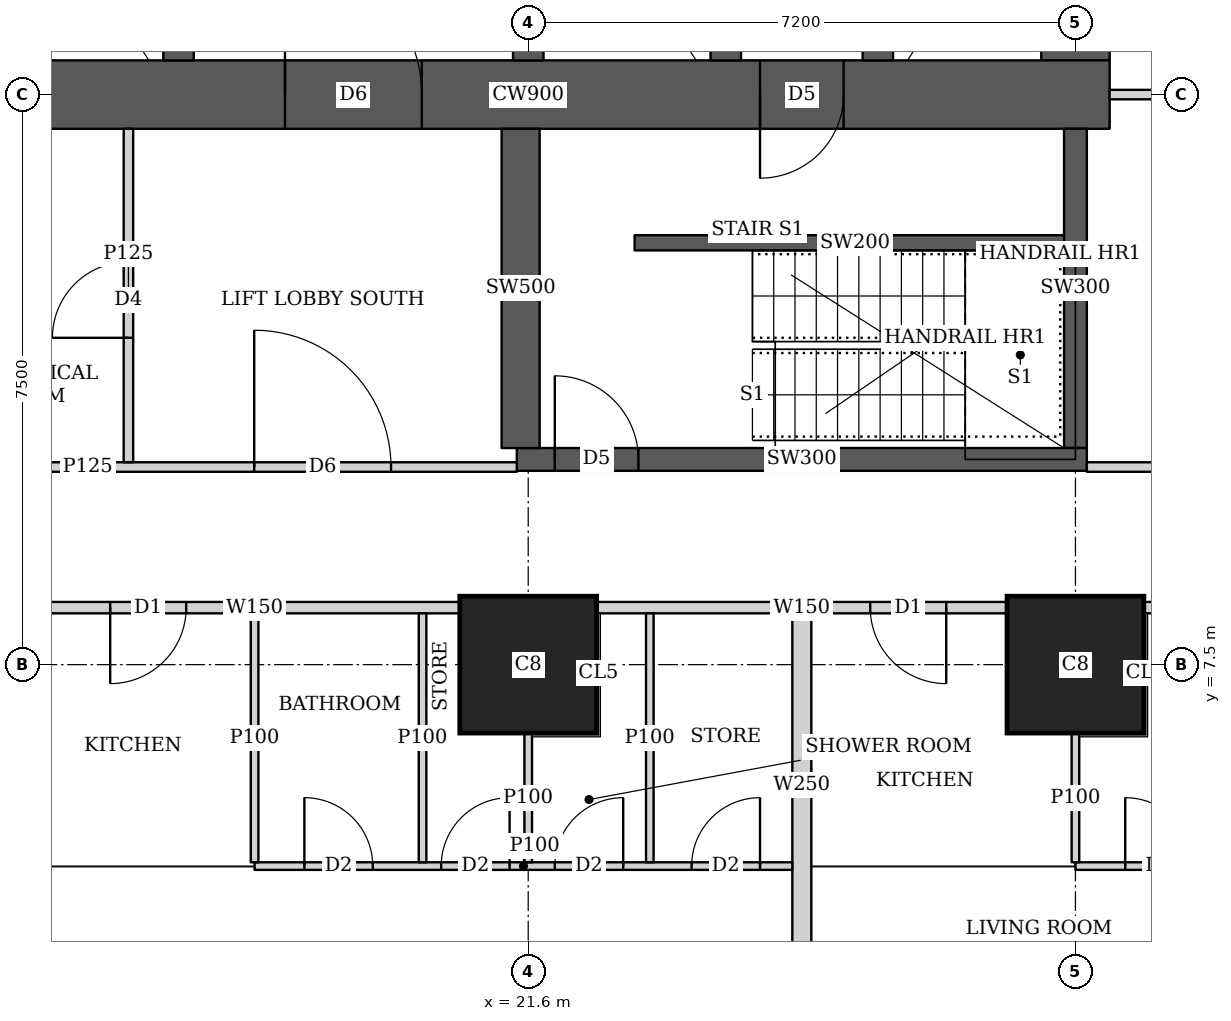
"""IFC4 building model, lengths in metres.
Left out: names, types, materials, properties, quantities, classifications, styles, units other than length and angle.
Written with IfcOpenShell. Run it as: python <this file> out.ifc"""

import sys

from ifc_helpers import new_model, si_unit, direction, frame, frame_2d, origin, origin_2d, place, context, subcontext, project, spatial, rectangle, extrude, element, fill, save


model = new_model("IFC4")
c1 = context("Model", 3, precision=1e-05, world=origin(), true_north=direction((0.0, 1.0)))
c2 = subcontext(c1, "Body", "Model", "MODEL_VIEW")
j1 = project(units=[si_unit("LENGTHUNIT", "METRE"), si_unit("PLANEANGLEUNIT", "RADIAN")], contexts=[c1])
p1 = place(None, origin())
s1 = spatial("IfcSite", under=j1, at=p1, CompositionType="ELEMENT")
p2 = place(p1, origin())
s2 = spatial("IfcBuilding", under=s1, at=p2, CompositionType="ELEMENT")
p3 = place(p2, frame((0.0, 0.0, 31.25)))
s3 = spatial("IfcBuildingStorey", under=s2, at=p3, CompositionType="ELEMENT", Elevation=31.25)
for number, where, z_axis, x_axis in (
    (1, (21.6, 7.5, 0.0), (0.0, 0.0, 1.0), (1.0, 0.0, 0.0)),
    (2, (28.8, 7.5, 0.0), (0.0, 0.0, 1.0), (1.0, 0.0, 0.0)),
):
    element("IfcColumn", number, at=place(p3, frame(where, z_axis=z_axis, x_axis=x_axis)), inside=s3, PredefinedType="COLUMN", context=c2, shape_type="SweptSolid", body=[
        extrude(rectangle(XDim=1.8, YDim=1.8, at=origin_2d()), origin(), (0.0, 0.0, 1.0), 3.75),
    ])
p4 = place(p3, frame((13.95, 15.0, 0.0), z_axis=(0.0, 0.0, 1.0), x_axis=(1.0, 0.0, 0.0)))
e3 = element("IfcWall", 3, at=p4, inside=s3, PredefinedType="SHEAR", context=c2, shape_type="SweptSolid", body=[
    extrude(rectangle(XDim=15.3, YDim=0.9, at=frame_2d((7.65, 0.0))), origin(), (0.0, 0.0, 1.0), 3.75),
])
p5 = place(p4, frame((4.45, 0.0, 0.0)))
e4 = element("IfcOpeningElement", 4, at=p5, cuts=e3, PredefinedType="OPENING", context=c2, shape_type="SweptSolid", body=[
    extrude(rectangle(XDim=1.8, YDim=2.1, at=frame_2d((0.9, 1.05))), frame((0.0, 0.46, 0.0), z_axis=(0.0, -1.0, 0.0), x_axis=(1.0, 0.0, 0.0)), (0.0, 0.0, 1.0), 0.92),
])
p6 = place(p4, frame((10.7, 0.0, 0.0)))
e5 = element("IfcOpeningElement", 5, at=p6, cuts=e3, PredefinedType="OPENING", context=c2, shape_type="SweptSolid", body=[
    extrude(rectangle(XDim=1.1, YDim=2.1, at=frame_2d((0.55, 1.05))), frame((0.0, 0.46, 0.0), z_axis=(0.0, -1.0, 0.0), x_axis=(1.0, 0.0, 0.0)), (0.0, 0.0, 1.0), 0.92),
])
p7 = place(p3, frame((28.8, 15.45, 0.0), z_axis=(0.0, 0.0, 1.0), x_axis=(0.0, 1.0, 0.0)))
e6 = element("IfcWall", 6, at=p7, inside=s3, PredefinedType="SHEAR", context=c2, shape_type="SweptSolid", body=[
    extrude(rectangle(XDim=14.1, YDim=0.9, at=frame_2d((7.05, 0.0))), origin(), (0.0, 0.0, 1.0), 3.75),
])
p8 = place(p3, frame((17.0, 15.45, 0.0), z_axis=(0.0, 0.0, 1.0), x_axis=(0.0, 1.0, 0.0)))
e7 = element("IfcWall", 7, at=p8, inside=s3, PredefinedType="SHEAR", context=c2, shape_type="SweptSolid", body=[
    extrude(rectangle(XDim=14.1, YDim=0.4, at=frame_2d((7.05, 0.0))), origin(), (0.0, 0.0, 1.0), 3.75),
])
p9 = place(p8, frame((0.875, 0.0, 0.0)))
e8 = element("IfcOpeningElement", 8, at=p9, cuts=e7, PredefinedType="OPENING", context=c2, shape_type="SweptSolid", body=[
    extrude(rectangle(XDim=1.1, YDim=2.1, at=frame_2d((0.55, 1.05))), frame((0.0, 0.21, 0.0), z_axis=(0.0, -1.0, 0.0), x_axis=(1.0, 0.0, 0.0)), (0.0, 0.0, 1.0), 0.42),
])
p10 = place(p8, frame((4.625, 0.0, 0.0)))
e9 = element("IfcOpeningElement", 9, at=p10, cuts=e7, PredefinedType="OPENING", context=c2, shape_type="SweptSolid", body=[
    extrude(rectangle(XDim=1.1, YDim=2.1, at=frame_2d((0.55, 1.05))), frame((0.0, 0.21, 0.0), z_axis=(0.0, -1.0, 0.0), x_axis=(1.0, 0.0, 0.0)), (0.0, 0.0, 1.0), 0.42),
])
p11 = place(p8, frame((8.375, 0.0, 0.0)))
e10 = element("IfcOpeningElement", 10, at=p11, cuts=e7, PredefinedType="OPENING", context=c2, shape_type="SweptSolid", body=[
    extrude(rectangle(XDim=1.1, YDim=2.1, at=frame_2d((0.55, 1.05))), frame((0.0, 0.21, 0.0), z_axis=(0.0, -1.0, 0.0), x_axis=(1.0, 0.0, 0.0)), (0.0, 0.0, 1.0), 0.42),
])
p12 = place(p8, frame((12.125, 0.0, 0.0)))
e11 = element("IfcOpeningElement", 11, at=p12, cuts=e7, PredefinedType="OPENING", context=c2, shape_type="SweptSolid", body=[
    extrude(rectangle(XDim=1.1, YDim=2.1, at=frame_2d((0.55, 1.05))), frame((0.0, 0.21, 0.0), z_axis=(0.0, -1.0, 0.0), x_axis=(1.0, 0.0, 0.0)), (0.0, 0.0, 1.0), 0.42),
])
for number, where, z_axis, x_axis in (
    (12, (21.6, 15.45, 0.0), (0.0, 0.0, 1.0), (0.0, 1.0, 0.0)),
    (13, (24.2, 15.45, 0.0), (0.0, 0.0, 1.0), (0.0, 1.0, 0.0)),
):
    element("IfcWall", number, at=place(p3, frame(where, z_axis=z_axis, x_axis=x_axis)), inside=s3, PredefinedType="SHEAR", context=c2, shape_type="SweptSolid", body=[
        extrude(rectangle(XDim=14.1, YDim=0.4, at=frame_2d((7.05, 0.0))), origin(), (0.0, 0.0, 1.0), 3.75),
    ])
p13 = place(p3, frame((26.2, 15.45, 0.0), z_axis=(0.0, 0.0, 1.0), x_axis=(0.0, 1.0, 0.0)))
e14 = element("IfcWall", 14, at=p13, inside=s3, PredefinedType="SHEAR", context=c2, shape_type="SweptSolid", body=[
    extrude(rectangle(XDim=3.1, YDim=0.4, at=frame_2d((1.55, 0.0))), origin(), (0.0, 0.0, 1.0), 3.75),
])
p14 = place(p13, frame((0.825, 0.0, 0.0)))
e15 = element("IfcOpeningElement", 15, at=p14, cuts=e14, PredefinedType="OPENING", context=c2, shape_type="SweptSolid", body=[
    extrude(rectangle(XDim=1.2, YDim=2.1, at=frame_2d((0.6, 1.05))), frame((0.0, 0.21, 0.0), z_axis=(0.0, -1.0, 0.0), x_axis=(1.0, 0.0, 0.0)), (0.0, 0.0, 1.0), 0.42),
])
p15 = place(p3, frame((21.45, 10.2, 0.0), z_axis=(0.0, 0.0, 1.0), x_axis=(1.0, 0.0, 0.0)))
e16 = element("IfcWall", 16, at=p15, inside=s3, PredefinedType="SHEAR", context=c2, shape_type="SweptSolid", body=[
    extrude(rectangle(XDim=7.5, YDim=0.3, at=frame_2d((3.75, 0.0))), origin(), (0.0, 0.0, 1.0), 3.75),
])
p16 = place(p15, frame((0.5, 0.0, 0.0)))
e17 = element("IfcOpeningElement", 17, at=p16, cuts=e16, PredefinedType="OPENING", context=c2, shape_type="SweptSolid", body=[
    extrude(rectangle(XDim=1.1, YDim=2.1, at=frame_2d((0.55, 1.05))), frame((0.0, 0.16, 0.0), z_axis=(0.0, -1.0, 0.0), x_axis=(1.0, 0.0, 0.0)), (0.0, 0.0, 1.0), 0.32),
])
p17 = place(p3, frame((21.5, 10.35, 0.0), z_axis=(0.0, 0.0, 1.0), x_axis=(0.0, 1.0, 0.0)))
e18 = element("IfcWall", 18, at=p17, inside=s3, PredefinedType="SHEAR", context=c2, shape_type="SweptSolid", body=[
    extrude(rectangle(XDim=4.2, YDim=0.5, at=frame_2d((2.1, 0.0))), origin(), (0.0, 0.0, 1.0), 3.75),
])
p18 = place(p3, frame((28.8, 10.35, 0.0), z_axis=(0.0, 0.0, 1.0), x_axis=(0.0, 1.0, 0.0)))
e19 = element("IfcWall", 19, at=p18, inside=s3, PredefinedType="SHEAR", context=c2, shape_type="SweptSolid", body=[
    extrude(rectangle(XDim=4.2, YDim=0.3, at=frame_2d((2.1, 0.0))), origin(), (0.0, 0.0, 1.0), 3.75),
])
p19 = place(p3, frame((35.099, 8.25, 0.0), z_axis=(0.0, 0.0, 1.0), x_axis=(-1.0, 0.0, 0.0)))
e20 = element("IfcWall", 20, at=p19, inside=s3, PredefinedType="SOLIDWALL", context=c2, shape_type="SweptSolid", body=[
    extrude(rectangle(XDim=5.398, YDim=0.15, at=frame_2d((2.699, 0.0))), origin(), (0.0, 0.0, 1.0), 3.5),
])
p20 = place(p3, frame((27.899, 8.25, 0.0), z_axis=(0.0, 0.0, 1.0), x_axis=(-1.0, 0.0, 0.0)))
e21 = element("IfcWall", 21, at=p20, inside=s3, PredefinedType="SOLIDWALL", context=c2, shape_type="SweptSolid", body=[
    extrude(rectangle(XDim=5.398, YDim=0.15, at=frame_2d((2.699, 0.0))), origin(), (0.0, 0.0, 1.0), 3.5),
])
p21 = place(p20, frame((0.799, 0.0, 0.0)))
e22 = element("IfcOpeningElement", 22, at=p21, cuts=e21, PredefinedType="OPENING", context=c2, shape_type="SweptSolid", body=[
    extrude(rectangle(XDim=1.0, YDim=2.1, at=frame_2d((0.5, 1.05))), frame((0.0, 0.085, 0.0), z_axis=(0.0, -1.0, 0.0), x_axis=(1.0, 0.0, 0.0)), (0.0, 0.0, 1.0), 0.17),
])
p22 = place(p3, frame((20.699, 8.25, 0.0), z_axis=(0.0, 0.0, 1.0), x_axis=(-1.0, 0.0, 0.0)))
e23 = element("IfcWall", 23, at=p22, inside=s3, PredefinedType="SOLIDWALL", context=c2, shape_type="SweptSolid", body=[
    extrude(rectangle(XDim=5.398, YDim=0.15, at=frame_2d((2.699, 0.0))), origin(), (0.0, 0.0, 1.0), 3.5),
])
p23 = place(p22, frame((3.599, 0.0, 0.0)))
e24 = element("IfcOpeningElement", 24, at=p23, cuts=e23, PredefinedType="OPENING", context=c2, shape_type="SweptSolid", body=[
    extrude(rectangle(XDim=1.0, YDim=2.1, at=frame_2d((0.5, 1.05))), frame((0.0, 0.085, 0.0), z_axis=(0.0, -1.0, 0.0), x_axis=(1.0, 0.0, 0.0)), (0.0, 0.0, 1.0), 0.17),
])
p24 = place(p3, frame((25.075, 4.85, 0.0), z_axis=(0.0, 0.0, 1.0), x_axis=(-1.0, 0.0, 0.0)))
e25 = element("IfcWall", 25, at=p24, inside=s3, PredefinedType="PARTITIONING", context=c2, shape_type="SweptSolid", body=[
    extrude(rectangle(XDim=7.075, YDim=0.1, at=frame_2d((3.538, 0.0))), origin(), (0.0, 0.0, 1.0), 3.5),
])
p25 = place(p24, frame((5.52, 0.0, 0.0)))
e26 = element("IfcOpeningElement", 26, at=p25, cuts=e25, PredefinedType="OPENING", context=c2, shape_type="SweptSolid", body=[
    extrude(rectangle(XDim=0.9, YDim=2.1, at=frame_2d((0.45, 1.05))), frame((0.0, 0.06, 0.0), z_axis=(0.0, -1.0, 0.0), x_axis=(1.0, 0.0, 0.0)), (0.0, 0.0, 1.0), 0.12),
])
p26 = place(p24, frame((2.225, 0.0, 0.0)))
e27 = element("IfcOpeningElement", 27, at=p26, cuts=e25, PredefinedType="OPENING", context=c2, shape_type="SweptSolid", body=[
    extrude(rectangle(XDim=0.9, YDim=2.1, at=frame_2d((0.45, 1.05))), frame((0.0, 0.06, 0.0), z_axis=(0.0, -1.0, 0.0), x_axis=(1.0, 0.0, 0.0)), (0.0, 0.0, 1.0), 0.12),
])
p27 = place(p24, frame((3.72, 0.0, 0.0)))
e28 = element("IfcOpeningElement", 28, at=p27, cuts=e25, PredefinedType="OPENING", context=c2, shape_type="SweptSolid", body=[
    extrude(rectangle(XDim=0.9, YDim=2.1, at=frame_2d((0.45, 1.05))), frame((0.0, 0.06, 0.0), z_axis=(0.0, -1.0, 0.0), x_axis=(1.0, 0.0, 0.0)), (0.0, 0.0, 1.0), 0.12),
])
p28 = place(p24, frame((0.425, 0.0, 0.0)))
e29 = element("IfcOpeningElement", 29, at=p28, cuts=e25, PredefinedType="OPENING", context=c2, shape_type="SweptSolid", body=[
    extrude(rectangle(XDim=0.9, YDim=2.1, at=frame_2d((0.45, 1.05))), frame((0.0, 0.06, 0.0), z_axis=(0.0, -1.0, 0.0), x_axis=(1.0, 0.0, 0.0)), (0.0, 0.0, 1.0), 0.12),
])
p29 = place(p3, frame((18.0, 4.9, 0.0), z_axis=(0.0, 0.0, 1.0), x_axis=(0.0, 1.0, 0.0)))
e30 = element("IfcWall", 30, at=p29, inside=s3, PredefinedType="PARTITIONING", context=c2, shape_type="SweptSolid", body=[
    extrude(rectangle(XDim=3.275, YDim=0.1, at=frame_2d((1.638, 0.0))), origin(), (0.0, 0.0, 1.0), 3.5),
])
p30 = place(p3, frame((21.6, 4.9, 0.0), z_axis=(0.0, 0.0, 1.0), x_axis=(0.0, 1.0, 0.0)))
e31 = element("IfcWall", 31, at=p30, inside=s3, PredefinedType="PARTITIONING", context=c2, shape_type="SweptSolid", body=[
    extrude(rectangle(XDim=1.699, YDim=0.1, at=frame_2d((0.85, 0.0))), origin(), (0.0, 0.0, 1.0), 3.5),
])
for number, where, z_axis, x_axis in (
    (32, (20.21, 4.9, 0.0), (0.0, 0.0, 1.0), (0.0, 1.0, 0.0)),
    (33, (23.2, 4.9, 0.0), (0.0, 0.0, 1.0), (0.0, 1.0, 0.0)),
):
    element("IfcWall", number, at=place(p3, frame(where, z_axis=z_axis, x_axis=x_axis)), inside=s3, PredefinedType="PARTITIONING", context=c2, shape_type="SweptSolid", body=[
        extrude(rectangle(XDim=3.275, YDim=0.1, at=frame_2d((1.638, 0.0))), origin(), (0.0, 0.0, 1.0), 3.5),
    ])
p31 = place(p3, frame((35.875, 4.85, 0.0), z_axis=(0.0, 0.0, 1.0), x_axis=(-1.0, 0.0, 0.0)))
e34 = element("IfcWall", 34, at=p31, inside=s3, PredefinedType="PARTITIONING", context=c2, shape_type="SweptSolid", body=[
    extrude(rectangle(XDim=7.075, YDim=0.1, at=frame_2d((3.538, 0.0))), origin(), (0.0, 0.0, 1.0), 3.5),
])
p32 = place(p31, frame((5.52, 0.0, 0.0)))
e35 = element("IfcOpeningElement", 35, at=p32, cuts=e34, PredefinedType="OPENING", context=c2, shape_type="SweptSolid", body=[
    extrude(rectangle(XDim=0.9, YDim=2.1, at=frame_2d((0.45, 1.05))), frame((0.0, 0.06, 0.0), z_axis=(0.0, -1.0, 0.0), x_axis=(1.0, 0.0, 0.0)), (0.0, 0.0, 1.0), 0.12),
])
p33 = place(p31, frame((2.225, 0.0, 0.0)))
e36 = element("IfcOpeningElement", 36, at=p33, cuts=e34, PredefinedType="OPENING", context=c2, shape_type="SweptSolid", body=[
    extrude(rectangle(XDim=0.9, YDim=2.1, at=frame_2d((0.45, 1.05))), frame((0.0, 0.06, 0.0), z_axis=(0.0, -1.0, 0.0), x_axis=(1.0, 0.0, 0.0)), (0.0, 0.0, 1.0), 0.12),
])
p34 = place(p31, frame((3.72, 0.0, 0.0)))
e37 = element("IfcOpeningElement", 37, at=p34, cuts=e34, PredefinedType="OPENING", context=c2, shape_type="SweptSolid", body=[
    extrude(rectangle(XDim=0.9, YDim=2.1, at=frame_2d((0.45, 1.05))), frame((0.0, 0.06, 0.0), z_axis=(0.0, -1.0, 0.0), x_axis=(1.0, 0.0, 0.0)), (0.0, 0.0, 1.0), 0.12),
])
p35 = place(p31, frame((0.425, 0.0, 0.0)))
e38 = element("IfcOpeningElement", 38, at=p35, cuts=e34, PredefinedType="OPENING", context=c2, shape_type="SweptSolid", body=[
    extrude(rectangle(XDim=0.9, YDim=2.1, at=frame_2d((0.45, 1.05))), frame((0.0, 0.06, 0.0), z_axis=(0.0, -1.0, 0.0), x_axis=(1.0, 0.0, 0.0)), (0.0, 0.0, 1.0), 0.12),
])
p36 = place(p3, frame((28.8, 4.9, 0.0), z_axis=(0.0, 0.0, 1.0), x_axis=(0.0, 1.0, 0.0)))
e39 = element("IfcWall", 39, at=p36, inside=s3, PredefinedType="PARTITIONING", context=c2, shape_type="SweptSolid", body=[
    extrude(rectangle(XDim=1.699, YDim=0.1, at=frame_2d((0.85, 0.0))), origin(), (0.0, 0.0, 1.0), 3.5),
])
p37 = place(p3, frame((25.2, 3.65, 0.0), z_axis=(0.0, 0.0, 1.0), x_axis=(0.0, 1.0, 0.0)))
e40 = element("IfcWall", 40, at=p37, inside=s3, PredefinedType="SOLIDWALL", context=c2, shape_type="SweptSolid", body=[
    extrude(rectangle(XDim=4.525, YDim=0.25, at=frame_2d((2.263, 0.0))), origin(), (0.0, 0.0, 1.0), 3.5),
])
p38 = place(p3, frame((10.163, 10.1, 0.0), z_axis=(0.0, 0.0, 1.0), x_axis=(1.0, 0.0, 0.0)))
e41 = element("IfcWall", 41, at=p38, inside=s3, PredefinedType="PARTITIONING", context=c2, shape_type="SweptSolid", body=[
    extrude(rectangle(XDim=11.287, YDim=0.125, at=frame_2d((5.644, 0.0))), origin(), (0.0, 0.0, 1.0), 3.5),
])
p39 = place(p38, frame((7.832, 0.0, 0.0)))
e42 = element("IfcOpeningElement", 42, at=p39, cuts=e41, PredefinedType="OPENING", context=c2, shape_type="SweptSolid", body=[
    extrude(rectangle(XDim=1.8, YDim=2.1, at=frame_2d((0.9, 1.05))), frame((0.0, 0.073, 0.0), z_axis=(0.0, -1.0, 0.0), x_axis=(1.0, 0.0, 0.0)), (0.0, 0.0, 1.0), 0.145),
])
p40 = place(p3, frame((16.34, 10.163, 0.0), z_axis=(0.0, 0.0, 1.0), x_axis=(0.0, 1.0, 0.0)))
e43 = element("IfcWall", 43, at=p40, inside=s3, PredefinedType="PARTITIONING", context=c2, shape_type="SweptSolid", body=[
    extrude(rectangle(XDim=4.387, YDim=0.125, at=frame_2d((2.193, 0.0))), origin(), (0.0, 0.0, 1.0), 3.5),
])
p41 = place(p40, frame((1.637, 0.0, 0.0)))
e44 = element("IfcOpeningElement", 44, at=p41, cuts=e43, PredefinedType="OPENING", context=c2, shape_type="SweptSolid", body=[
    extrude(rectangle(XDim=1.0, YDim=2.1, at=frame_2d((0.5, 1.05))), frame((0.0, 0.073, 0.0), z_axis=(0.0, -1.0, 0.0), x_axis=(1.0, 0.0, 0.0)), (0.0, 0.0, 1.0), 0.145),
])
p42 = place(p3, frame((28.95, 10.1, 0.0), z_axis=(0.0, 0.0, 1.0), x_axis=(1.0, 0.0, 0.0)))
e45 = element("IfcWall", 45, at=p42, inside=s3, PredefinedType="PARTITIONING", context=c2, shape_type="SweptSolid", body=[
    extrude(rectangle(XDim=9.188, YDim=0.125, at=frame_2d((4.594, 0.0))), origin(), (0.0, 0.0, 1.0), 3.5),
])
p43 = place(p3, frame((29.25, 15.0, 0.0), z_axis=(0.0, 0.0, 1.0), x_axis=(1.0, 0.0, 0.0)))
e46 = element("IfcWall", 46, at=p43, inside=s3, PredefinedType="PARTITIONING", context=c2, shape_type="SweptSolid", body=[
    extrude(rectangle(XDim=5.849, YDim=0.125, at=frame_2d((2.925, 0.0))), origin(), (0.0, 0.0, 1.0), 3.5),
])
p44 = place(p3, frame((23.0, 13.05, 0.0), z_axis=(0.0, 0.0, 1.0), x_axis=(1.0, 0.0, 0.0)))
e47 = element("IfcWall", 47, at=p44, inside=s3, PredefinedType="SHEAR", context=c2, shape_type="SweptSolid", body=[
    extrude(rectangle(XDim=5.8, YDim=0.2, at=frame_2d((2.9, 0.0))), origin(), (0.0, 0.0, 1.0), 3.75),
])
p45 = place(p25, origin())
e48 = element("IfcDoor", 48, at=p45, inside=s3, OperationType="SINGLE_SWING_LEFT", PredefinedType="DOOR", context=c2, shape_type="SweptSolid", body=[
    extrude(rectangle(XDim=0.9, YDim=2.1, at=frame_2d((0.45, 1.05))), frame((0.0, 0.025, 0.0), z_axis=(0.0, -1.0, 0.0), x_axis=(1.0, 0.0, 0.0)), (0.0, 0.0, 1.0), 0.05),
])
fill(e26, e48)
p46 = place(p26, origin())
e49 = element("IfcDoor", 49, at=p46, inside=s3, OperationType="SINGLE_SWING_RIGHT", PredefinedType="DOOR", context=c2, shape_type="SweptSolid", body=[
    extrude(rectangle(XDim=0.9, YDim=2.1, at=frame_2d((0.45, 1.05))), frame((0.0, 0.025, 0.0), z_axis=(0.0, -1.0, 0.0), x_axis=(1.0, 0.0, 0.0)), (0.0, 0.0, 1.0), 0.05),
])
fill(e27, e49)
p47 = place(p27, origin())
e50 = element("IfcDoor", 50, at=p47, inside=s3, OperationType="SINGLE_SWING_RIGHT", PredefinedType="DOOR", context=c2, shape_type="SweptSolid", body=[
    extrude(rectangle(XDim=0.9, YDim=2.1, at=frame_2d((0.45, 1.05))), frame((0.0, 0.025, 0.0), z_axis=(0.0, -1.0, 0.0), x_axis=(1.0, 0.0, 0.0)), (0.0, 0.0, 1.0), 0.05),
])
fill(e28, e50)
p48 = place(p28, origin())
e51 = element("IfcDoor", 51, at=p48, inside=s3, OperationType="SINGLE_SWING_RIGHT", PredefinedType="DOOR", context=c2, shape_type="SweptSolid", body=[
    extrude(rectangle(XDim=0.9, YDim=2.1, at=frame_2d((0.45, 1.05))), frame((0.0, 0.025, 0.0), z_axis=(0.0, -1.0, 0.0), x_axis=(1.0, 0.0, 0.0)), (0.0, 0.0, 1.0), 0.05),
])
fill(e29, e51)
p49 = place(p23, origin())
e52 = element("IfcDoor", 52, at=p49, inside=s3, OperationType="SINGLE_SWING_RIGHT", PredefinedType="DOOR", context=c2, shape_type="SweptSolid", body=[
    extrude(rectangle(XDim=1.0, YDim=2.1, at=frame_2d((0.5, 1.05))), frame((0.0, 0.025, 0.0), z_axis=(0.0, -1.0, 0.0), x_axis=(1.0, 0.0, 0.0)), (0.0, 0.0, 1.0), 0.05),
])
fill(e24, e52)
p50 = place(p32, origin())
e53 = element("IfcDoor", 53, at=p50, inside=s3, OperationType="SINGLE_SWING_LEFT", PredefinedType="DOOR", context=c2, shape_type="SweptSolid", body=[
    extrude(rectangle(XDim=0.9, YDim=2.1, at=frame_2d((0.45, 1.05))), frame((0.0, 0.025, 0.0), z_axis=(0.0, -1.0, 0.0), x_axis=(1.0, 0.0, 0.0)), (0.0, 0.0, 1.0), 0.05),
])
fill(e35, e53)
p51 = place(p21, origin())
e54 = element("IfcDoor", 54, at=p51, inside=s3, OperationType="SINGLE_SWING_LEFT", PredefinedType="DOOR", context=c2, shape_type="SweptSolid", body=[
    extrude(rectangle(XDim=1.0, YDim=2.1, at=frame_2d((0.5, 1.05))), frame((0.0, 0.025, 0.0), z_axis=(0.0, -1.0, 0.0), x_axis=(1.0, 0.0, 0.0)), (0.0, 0.0, 1.0), 0.05),
])
fill(e22, e54)
p52 = place(p41, origin())
e55 = element("IfcDoor", 55, at=p52, inside=s3, OperationType="SINGLE_SWING_LEFT", PredefinedType="DOOR", context=c2, shape_type="SweptSolid", body=[
    extrude(rectangle(XDim=1.0, YDim=2.1, at=frame_2d((0.5, 1.05))), frame((0.0, 0.025, 0.0), z_axis=(0.0, -1.0, 0.0), x_axis=(1.0, 0.0, 0.0)), (0.0, 0.0, 1.0), 0.05),
])
fill(e44, e55)
p53 = place(p39, origin())
e56 = element("IfcDoor", 56, at=p53, inside=s3, OperationType="DOUBLE_DOOR_SINGLE_SWING", PredefinedType="DOOR", context=c2, shape_type="SweptSolid", body=[
    extrude(rectangle(XDim=1.8, YDim=2.1, at=frame_2d((0.9, 1.05))), frame((0.0, 0.025, 0.0), z_axis=(0.0, -1.0, 0.0), x_axis=(1.0, 0.0, 0.0)), (0.0, 0.0, 1.0), 0.05),
])
fill(e42, e56)
p54 = place(p5, origin())
e57 = element("IfcDoor", 57, at=p54, inside=s3, OperationType="DOUBLE_DOOR_SINGLE_SWING", PredefinedType="DOOR", context=c2, shape_type="SweptSolid", body=[
    extrude(rectangle(XDim=1.8, YDim=2.1, at=frame_2d((0.9, 1.05))), frame((0.0, 0.025, 0.0), z_axis=(0.0, -1.0, 0.0), x_axis=(1.0, 0.0, 0.0)), (0.0, 0.0, 1.0), 0.05),
])
fill(e4, e57)
p55 = place(p6, origin())
e58 = element("IfcDoor", 58, at=p55, inside=s3, OperationType="SINGLE_SWING_RIGHT", PredefinedType="DOOR", context=c2, shape_type="SweptSolid", body=[
    extrude(rectangle(XDim=1.1, YDim=2.1, at=frame_2d((0.55, 1.05))), frame((0.0, 0.025, 0.0), z_axis=(0.0, -1.0, 0.0), x_axis=(1.0, 0.0, 0.0)), (0.0, 0.0, 1.0), 0.05),
])
fill(e5, e58)
p56 = place(p16, origin())
e59 = element("IfcDoor", 59, at=p56, inside=s3, OperationType="SINGLE_SWING_LEFT", PredefinedType="DOOR", context=c2, shape_type="SweptSolid", body=[
    extrude(rectangle(XDim=1.1, YDim=2.1, at=frame_2d((0.55, 1.05))), frame((0.0, 0.025, 0.0), z_axis=(0.0, -1.0, 0.0), x_axis=(1.0, 0.0, 0.0)), (0.0, 0.0, 1.0), 0.05),
])
fill(e17, e59)
save(model, sys.argv[1])
